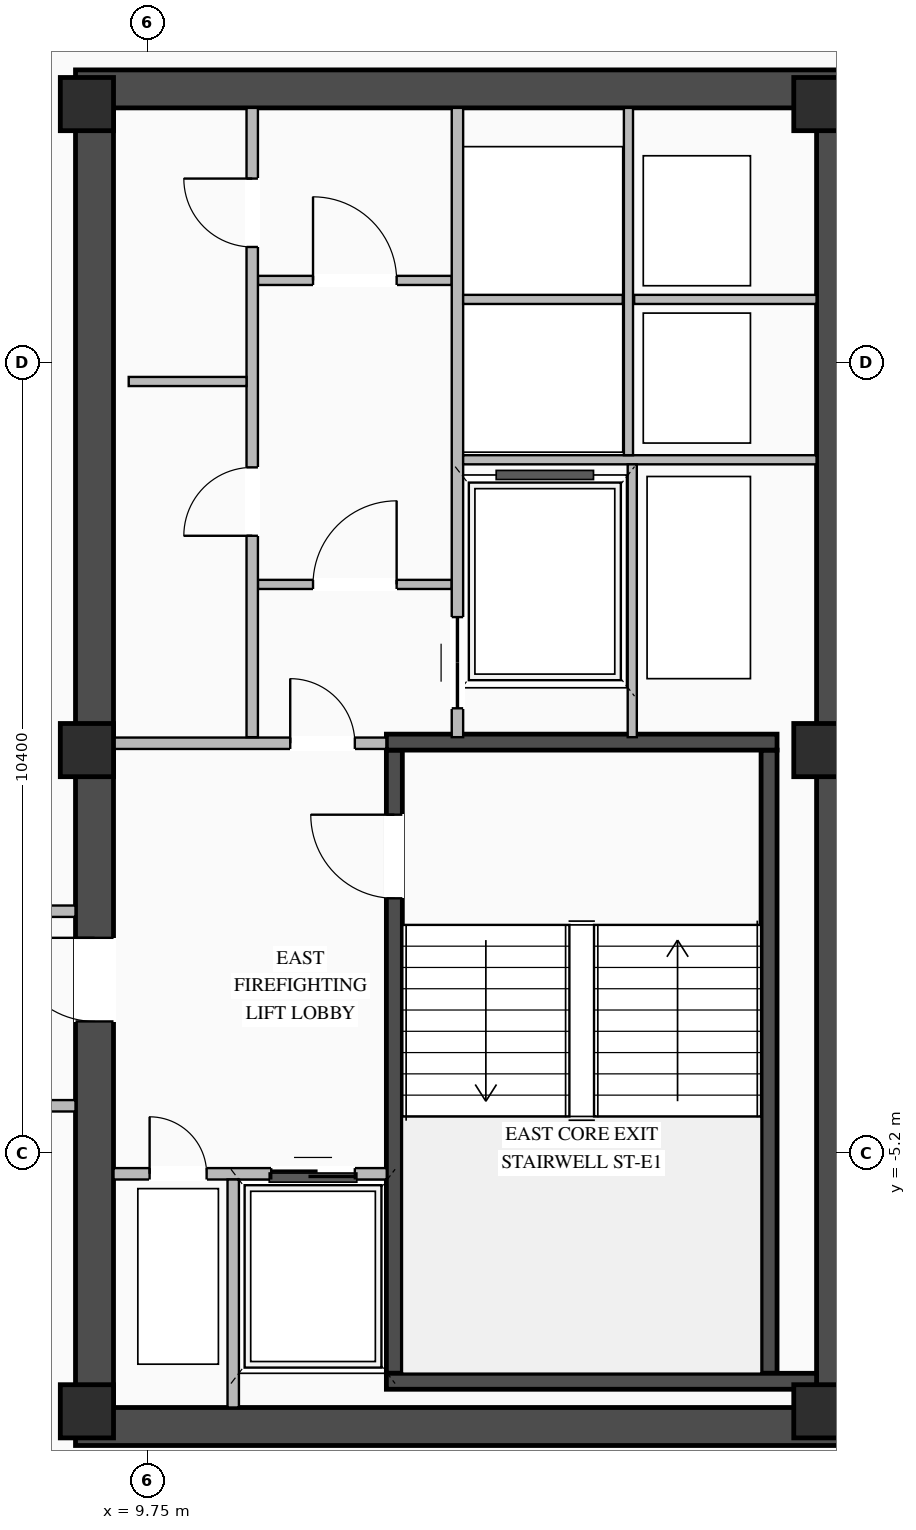
"""IFC4 building model, lengths in metres.
Left out: names, types, materials, properties, quantities, classifications, styles, units other than length and angle.
Written with IfcOpenShell. Run it as: python <this file> out.ifc"""

import sys

from ifc_helpers import new_model, si_unit, direction, frame, frame_2d, origin, origin_2d, place, context, subcontext, project, spatial, rectangle, extrude, element, fill, save


model = new_model("IFC4")
c1 = context("Model", 3, precision=1e-05, world=origin(), true_north=direction((0.0, 1.0)))
c2 = subcontext(c1, "Body", "Model", "MODEL_VIEW")
j1 = project(units=[si_unit("LENGTHUNIT", "METRE"), si_unit("PLANEANGLEUNIT", "RADIAN")], contexts=[c1])
p1 = place(None, origin())
s1 = spatial("IfcSite", under=j1, at=p1, CompositionType="ELEMENT")
p2 = place(p1, origin())
s2 = spatial("IfcBuilding", under=s1, at=p2, CompositionType="ELEMENT")
p3 = place(p2, frame((0.0, 0.0, 286.95)))
s3 = spatial("IfcBuildingStorey", under=s2, at=p3, CompositionType="ELEMENT", Elevation=286.95)
for number, where, z_axis, x_axis in (
    (1, (8.8, -8.8, 0.0), (0.0, 0.0, 1.0), (1.0, 0.0, 0.0)),
    (2, (8.8, 8.8, 0.0), (0.0, 0.0, 1.0), (1.0, 0.0, 0.0)),
):
    element("IfcWall", number, at=place(p3, frame(where, z_axis=z_axis, x_axis=x_axis)), inside=s3, PredefinedType="SHEAR", context=c2, shape_type="SweptSolid", body=[
        extrude(rectangle(XDim=10.25, YDim=0.5, at=frame_2d((5.125, 0.0))), origin(), (0.0, 0.0, 1.0), 3.35),
    ])
p4 = place(p3, frame((9.05, -8.55, 0.0), z_axis=(0.0, 0.0, 1.0), x_axis=(0.0, 1.0, 0.0)))
e3 = element("IfcWall", 3, at=p4, inside=s3, PredefinedType="SHEAR", context=c2, shape_type="SweptSolid", body=[
    extrude(rectangle(XDim=17.1, YDim=0.5, at=frame_2d((8.55, 0.0))), origin(), (0.0, 0.0, 1.0), 3.35),
])
p5 = place(p4, frame((5.08, 0.0, 0.0)))
e4 = element("IfcOpeningElement", 4, at=p5, cuts=e3, PredefinedType="OPENING", context=c2, shape_type="SweptSolid", body=[
    extrude(rectangle(XDim=1.1, YDim=2.08, at=frame_2d((0.55, 1.04))), frame((0.0, 0.26, 0.0), z_axis=(0.0, -1.0, 0.0), x_axis=(1.0, 0.0, 0.0)), (0.0, 0.0, 1.0), 0.52),
])
p6 = place(p3, frame((18.8, -8.55, 0.0), z_axis=(0.0, 0.0, 1.0), x_axis=(0.0, 1.0, 0.0)))
e5 = element("IfcWall", 5, at=p6, inside=s3, PredefinedType="SHEAR", context=c2, shape_type="SweptSolid", body=[
    extrude(rectangle(XDim=17.1, YDim=0.5, at=frame_2d((8.55, 0.0))), origin(), (0.0, 0.0, 1.0), 3.35),
])
p7 = place(p3, frame((12.995, -8.1, 0.0), z_axis=(0.0, 0.0, 1.0), x_axis=(0.0, 1.0, 0.0)))
e6 = element("IfcWall", 6, at=p7, inside=s3, PredefinedType="SHEAR", context=c2, shape_type="SweptSolid", body=[
    extrude(rectangle(XDim=8.2, YDim=0.21, at=frame_2d((4.1, 0.0))), origin(), (0.0, 0.0, 1.0), 3.35),
])
p8 = place(p7, frame((6.25, 0.0, 0.0)))
e7 = element("IfcOpeningElement", 7, at=p8, cuts=e6, PredefinedType="OPENING", context=c2, shape_type="SweptSolid", body=[
    extrude(rectangle(XDim=1.1, YDim=2.15, at=frame_2d((0.55, 1.075))), frame((0.0, 0.115, 0.0), z_axis=(0.0, -1.0, 0.0), x_axis=(1.0, 0.0, 0.0)), (0.0, 0.0, 1.0), 0.23),
])
p9 = place(p3, frame((17.925, -8.1, 0.0), z_axis=(0.0, 0.0, 1.0), x_axis=(0.0, 1.0, 0.0)))
e8 = element("IfcWall", 8, at=p9, inside=s3, PredefinedType="SHEAR", context=c2, shape_type="SweptSolid", body=[
    extrude(rectangle(XDim=8.2, YDim=0.21, at=frame_2d((4.1, 0.0))), origin(), (0.0, 0.0, 1.0), 3.35),
])
p10 = place(p3, frame((12.89, -8.205, 0.0), z_axis=(0.0, 0.0, 1.0), x_axis=(1.0, 0.0, 0.0)))
e9 = element("IfcWall", 9, at=p10, inside=s3, PredefinedType="SHEAR", context=c2, shape_type="SweptSolid", body=[
    extrude(rectangle(XDim=5.66, YDim=0.21, at=frame_2d((2.83, 0.0))), origin(), (0.0, 0.0, 1.0), 3.35),
])
p11 = place(p3, frame((18.03, 0.205, 0.0), z_axis=(0.0, 0.0, 1.0), x_axis=(-1.0, 0.0, 0.0)))
e10 = element("IfcWall", 10, at=p11, inside=s3, PredefinedType="SHEAR", context=c2, shape_type="SweptSolid", body=[
    extrude(rectangle(XDim=5.14, YDim=0.21, at=frame_2d((2.57, 0.0))), origin(), (0.0, 0.0, 1.0), 3.35),
])
for number, where, z_axis, x_axis in (
    (11, (8.95, -8.6, 0.0), (0.0, 0.0, 1.0), (1.0, 0.0, 0.0)),
    (12, (8.95, 0.1, 0.0), (0.0, 0.0, 1.0), (1.0, 0.0, 0.0)),
    (13, (8.95, 8.6, 0.0), (0.0, 0.0, 1.0), (1.0, 0.0, 0.0)),
    (14, (18.6, -8.6, 0.0), (0.0, 0.0, 1.0), (1.0, 0.0, 0.0)),
    (15, (18.6, 0.1, 0.0), (0.0, 0.0, 1.0), (1.0, 0.0, 0.0)),
    (16, (18.6, 8.6, 0.0), (0.0, 0.0, 1.0), (1.0, 0.0, 0.0)),
):
    element("IfcColumn", number, at=place(p3, frame(where, z_axis=z_axis, x_axis=x_axis)), inside=s3, PredefinedType="COLUMN", context=c2, shape_type="SweptSolid", body=[
        extrude(rectangle(XDim=0.7, YDim=0.7, at=origin_2d()), origin(), (0.0, 0.0, 1.0), 3.6),
    ])
p12 = place(p3, frame((9.3, -5.475, 0.0), z_axis=(0.0, 0.0, 1.0), x_axis=(1.0, 0.0, 0.0)))
e17 = element("IfcWall", 17, at=p12, inside=s3, PredefinedType="STANDARD", context=c2, shape_type="SweptSolid", body=[
    extrude(rectangle(XDim=3.595, YDim=0.15, at=frame_2d((1.797, 0.0))), origin(), (0.0, 0.0, 1.0), 3.33),
])
p13 = place(p12, frame((2.075, 0.0, 0.0)))
e18 = element("IfcOpeningElement", 18, at=p13, cuts=e17, PredefinedType="OPENING", context=c2, shape_type="SweptSolid", body=[
    extrude(rectangle(XDim=1.1, YDim=2.15, at=frame_2d((0.55, 1.075))), frame((0.0, 0.085, 0.0), z_axis=(0.0, -1.0, 0.0), x_axis=(1.0, 0.0, 0.0)), (0.0, 0.0, 1.0), 0.17),
])
p14 = place(p12, frame((0.475, 0.0, 0.0)))
e19 = element("IfcOpeningElement", 19, at=p14, cuts=e17, PredefinedType="OPENING", context=c2, shape_type="SweptSolid", body=[
    extrude(rectangle(XDim=0.75, YDim=2.05, at=frame_2d((0.375, 1.025))), frame((0.0, 0.085, 0.0), z_axis=(0.0, -1.0, 0.0), x_axis=(1.0, 0.0, 0.0)), (0.0, 0.0, 1.0), 0.17),
])
p15 = place(p3, frame((10.875, -8.55, 0.0), z_axis=(0.0, 0.0, 1.0), x_axis=(0.0, 1.0, 0.0)))
e20 = element("IfcWall", 20, at=p15, inside=s3, PredefinedType="STANDARD", context=c2, shape_type="SweptSolid", body=[
    extrude(rectangle(XDim=3.0, YDim=0.15, at=frame_2d((1.5, 0.0))), origin(), (0.0, 0.0, 1.0), 3.33),
])
p16 = place(p3, frame((9.3, 0.19, 0.0), z_axis=(0.0, 0.0, 1.0), x_axis=(1.0, 0.0, 0.0)))
e21 = element("IfcWall", 21, at=p16, inside=s3, PredefinedType="STANDARD", context=c2, shape_type="SweptSolid", body=[
    extrude(rectangle(XDim=3.59, YDim=0.15, at=frame_2d((1.795, 0.0))), origin(), (0.0, 0.0, 1.0), 2.825),
])
p17 = place(p16, frame((2.325, 0.0, 0.0)))
e22 = element("IfcOpeningElement", 22, at=p17, cuts=e21, PredefinedType="OPENING", context=c2, shape_type="SweptSolid", body=[
    extrude(rectangle(XDim=0.85, YDim=2.04, at=frame_2d((0.425, 1.02))), frame((0.0, 0.085, 0.0), z_axis=(0.0, -1.0, 0.0), x_axis=(1.0, 0.0, 0.0)), (0.0, 0.0, 1.0), 0.17),
])
p18 = place(p3, frame((11.2, 2.28, 0.0), z_axis=(0.0, 0.0, 1.0), x_axis=(1.0, 0.0, 0.0)))
e23 = element("IfcWall", 23, at=p18, inside=s3, PredefinedType="STANDARD", context=c2, shape_type="SweptSolid", body=[
    extrude(rectangle(XDim=2.55, YDim=0.12, at=frame_2d((1.275, 0.0))), origin(), (0.0, 0.0, 1.0), 3.33),
])
p19 = place(p18, frame((0.725, 0.0, 0.0)))
e24 = element("IfcOpeningElement", 24, at=p19, cuts=e23, PredefinedType="OPENING", context=c2, shape_type="SweptSolid", body=[
    extrude(rectangle(XDim=1.1, YDim=2.1, at=frame_2d((0.55, 1.05))), frame((0.0, 0.07, 0.0), z_axis=(0.0, -1.0, 0.0), x_axis=(1.0, 0.0, 0.0)), (0.0, 0.0, 1.0), 0.14),
])
p20 = place(p3, frame((11.2, 6.28, 0.0), z_axis=(0.0, 0.0, 1.0), x_axis=(1.0, 0.0, 0.0)))
e25 = element("IfcWall", 25, at=p20, inside=s3, PredefinedType="STANDARD", context=c2, shape_type="SweptSolid", body=[
    extrude(rectangle(XDim=2.55, YDim=0.12, at=frame_2d((1.275, 0.0))), origin(), (0.0, 0.0, 1.0), 3.33),
])
p21 = place(p20, frame((0.725, 0.0, 0.0)))
e26 = element("IfcOpeningElement", 26, at=p21, cuts=e25, PredefinedType="OPENING", context=c2, shape_type="SweptSolid", body=[
    extrude(rectangle(XDim=1.1, YDim=2.1, at=frame_2d((0.55, 1.05))), frame((0.0, 0.07, 0.0), z_axis=(0.0, -1.0, 0.0), x_axis=(1.0, 0.0, 0.0)), (0.0, 0.0, 1.0), 0.14),
])
p22 = place(p3, frame((11.125, 0.27, 0.0), z_axis=(0.0, 0.0, 1.0), x_axis=(0.0, 1.0, 0.0)))
e27 = element("IfcWall", 27, at=p22, inside=s3, PredefinedType="STANDARD", context=c2, shape_type="SweptSolid", body=[
    extrude(rectangle(XDim=8.28, YDim=0.15, at=frame_2d((4.14, 0.0))), origin(), (0.0, 0.0, 1.0), 3.33),
])
p23 = place(p22, frame((2.65, 0.0, 0.0)))
e28 = element("IfcOpeningElement", 28, at=p23, cuts=e27, PredefinedType="OPENING", context=c2, shape_type="SweptSolid", body=[
    extrude(rectangle(XDim=0.9, YDim=2.05, at=frame_2d((0.45, 1.025))), frame((0.0, 0.085, 0.0), z_axis=(0.0, -1.0, 0.0), x_axis=(1.0, 0.0, 0.0)), (0.0, 0.0, 1.0), 0.17),
])
p24 = place(p22, frame((6.45, 0.0, 0.0)))
e29 = element("IfcOpeningElement", 29, at=p24, cuts=e27, PredefinedType="OPENING", context=c2, shape_type="SweptSolid", body=[
    extrude(rectangle(XDim=0.9, YDim=2.05, at=frame_2d((0.45, 1.025))), frame((0.0, 0.085, 0.0), z_axis=(0.0, -1.0, 0.0), x_axis=(1.0, 0.0, 0.0)), (0.0, 0.0, 1.0), 0.17),
])
p25 = place(p3, frame((9.5, 4.95, 0.0), z_axis=(0.0, 0.0, 1.0), x_axis=(1.0, 0.0, 0.0)))
e30 = element("IfcWall", 30, at=p25, inside=s3, PredefinedType="STANDARD", context=c2, shape_type="SweptSolid", body=[
    extrude(rectangle(XDim=1.55, YDim=0.12, at=frame_2d((0.775, 0.0))), origin(), (0.0, 0.0, 1.0), 3.33),
])
p26 = place(p3, frame((13.825, 0.27, 0.0), z_axis=(0.0, 0.0, 1.0), x_axis=(0.0, 1.0, 0.0)))
e31 = element("IfcWall", 31, at=p26, inside=s3, PredefinedType="STANDARD", context=c2, shape_type="SweptSolid", body=[
    extrude(rectangle(XDim=8.28, YDim=0.15, at=frame_2d((4.14, 0.0))), origin(), (0.0, 0.0, 1.0), 3.33),
])
p27 = place(p26, frame((0.38, 0.0, 0.0)))
e32 = element("IfcOpeningElement", 32, at=p27, cuts=e31, PredefinedType="OPENING", context=c2, shape_type="SweptSolid", body=[
    extrude(rectangle(XDim=1.2, YDim=2.1, at=frame_2d((0.6, 1.05))), frame((0.0, 0.085, 0.0), z_axis=(0.0, -1.0, 0.0), x_axis=(1.0, 0.0, 0.0)), (0.0, 0.0, 1.0), 0.17),
])
p28 = place(p3, frame((13.9, 3.92, 0.0), z_axis=(0.0, 0.0, 1.0), x_axis=(1.0, 0.0, 0.0)))
e33 = element("IfcWall", 33, at=p28, inside=s3, PredefinedType="STANDARD", context=c2, shape_type="SweptSolid", body=[
    extrude(rectangle(XDim=4.65, YDim=0.12, at=frame_2d((2.325, 0.0))), origin(), (0.0, 0.0, 1.0), 3.33),
])
p29 = place(p3, frame((16.15, 6.03, 0.0), z_axis=(0.0, 0.0, 1.0), x_axis=(1.0, 0.0, 0.0)))
e34 = element("IfcWall", 34, at=p29, inside=s3, PredefinedType="STANDARD", context=c2, shape_type="SweptSolid", body=[
    extrude(rectangle(XDim=2.4, YDim=0.12, at=frame_2d((1.2, 0.0))), origin(), (0.0, 0.0, 1.0), 3.33),
])
p30 = place(p3, frame((16.075, 3.98, 0.0), z_axis=(0.0, 0.0, 1.0), x_axis=(0.0, 1.0, 0.0)))
e35 = element("IfcWall", 35, at=p30, inside=s3, PredefinedType="STANDARD", context=c2, shape_type="SweptSolid", body=[
    extrude(rectangle(XDim=4.57, YDim=0.12, at=frame_2d((2.285, 0.0))), origin(), (0.0, 0.0, 1.0), 3.33),
])
p31 = place(p3, frame((13.9, 6.03, 0.0), z_axis=(0.0, 0.0, 1.0), x_axis=(1.0, 0.0, 0.0)))
e36 = element("IfcWall", 36, at=p31, inside=s3, PredefinedType="STANDARD", context=c2, shape_type="SweptSolid", body=[
    extrude(rectangle(XDim=2.1, YDim=0.12, at=frame_2d((1.05, 0.0))), origin(), (0.0, 0.0, 1.0), 3.33),
])
p32 = place(p3, frame((16.125, 0.27, 0.0), z_axis=(0.0, 0.0, 1.0), x_axis=(0.0, 1.0, 0.0)))
e37 = element("IfcWall", 37, at=p32, inside=s3, PredefinedType="STANDARD", context=c2, shape_type="SweptSolid", body=[
    extrude(rectangle(XDim=3.59, YDim=0.12, at=frame_2d((1.795, 0.0))), origin(), (0.0, 0.0, 1.0), 3.33),
])
p33 = place(p3, frame((-8.8, -2.02, 0.0), z_axis=(0.0, 0.0, 1.0), x_axis=(1.0, 0.0, 0.0)))
e38 = element("IfcWall", 38, at=p33, inside=s3, PredefinedType="STANDARD", context=c2, shape_type="SweptSolid", body=[
    extrude(rectangle(XDim=17.6, YDim=0.15, at=frame_2d((8.8, 0.0))), origin(), (0.0, 0.0, 1.0), 3.33),
])
p34 = place(p33, frame((4.6, 0.0, 0.0)))
e39 = element("IfcOpeningElement", 39, at=p34, cuts=e38, PredefinedType="OPENING", context=c2, shape_type="SweptSolid", body=[
    extrude(rectangle(XDim=1.0, YDim=2.02, at=frame_2d((0.5, 1.01))), frame((0.0, 0.085, 0.0), z_axis=(0.0, -1.0, 0.0), x_axis=(1.0, 0.0, 0.0)), (0.0, 0.0, 1.0), 0.17),
])
p35 = place(p33, frame((13.4, 0.0, 0.0)))
e40 = element("IfcOpeningElement", 40, at=p35, cuts=e38, PredefinedType="OPENING", context=c2, shape_type="SweptSolid", body=[
    extrude(rectangle(XDim=1.0, YDim=2.02, at=frame_2d((0.5, 1.01))), frame((0.0, 0.085, 0.0), z_axis=(0.0, -1.0, 0.0), x_axis=(1.0, 0.0, 0.0)), (0.0, 0.0, 1.0), 0.17),
])
p36 = place(p3, frame((-8.8, -4.58, 0.0), z_axis=(0.0, 0.0, 1.0), x_axis=(1.0, 0.0, 0.0)))
e41 = element("IfcWall", 41, at=p36, inside=s3, PredefinedType="STANDARD", context=c2, shape_type="SweptSolid", body=[
    extrude(rectangle(XDim=17.6, YDim=0.15, at=frame_2d((8.8, 0.0))), origin(), (0.0, 0.0, 1.0), 3.33),
])
p37 = place(p36, frame((4.6, 0.0, 0.0)))
e42 = element("IfcOpeningElement", 42, at=p37, cuts=e41, PredefinedType="OPENING", context=c2, shape_type="SweptSolid", body=[
    extrude(rectangle(XDim=1.0, YDim=2.02, at=frame_2d((0.5, 1.01))), frame((0.0, 0.085, 0.0), z_axis=(0.0, -1.0, 0.0), x_axis=(1.0, 0.0, 0.0)), (0.0, 0.0, 1.0), 0.17),
])
p38 = place(p8, origin())
e43 = element("IfcDoor", 43, at=p38, inside=s3, OperationType="SINGLE_SWING_RIGHT", PredefinedType="DOOR", context=c2, shape_type="SweptSolid", body=[
    extrude(rectangle(XDim=1.1, YDim=2.15, at=frame_2d((0.55, 1.075))), frame((0.0, 0.025, 0.0), z_axis=(0.0, -1.0, 0.0), x_axis=(1.0, 0.0, 0.0)), (0.0, 0.0, 1.0), 0.05),
])
fill(e7, e43)
p39 = place(p13, origin())
e44 = element("IfcDoor", 44, at=p39, inside=s3, OperationType="DOUBLE_DOOR_SLIDING", PredefinedType="DOOR", context=c2, shape_type="SweptSolid", body=[
    extrude(rectangle(XDim=1.1, YDim=2.15, at=frame_2d((0.55, 1.075))), frame((0.0, 0.025, 0.0), z_axis=(0.0, -1.0, 0.0), x_axis=(1.0, 0.0, 0.0)), (0.0, 0.0, 1.0), 0.05),
])
fill(e18, e44)
p40 = place(p14, origin())
e45 = element("IfcDoor", 45, at=p40, inside=s3, OperationType="SINGLE_SWING_LEFT", PredefinedType="DOOR", context=c2, shape_type="SweptSolid", body=[
    extrude(rectangle(XDim=0.75, YDim=2.05, at=frame_2d((0.375, 1.025))), frame((0.0, 0.025, 0.0), z_axis=(0.0, -1.0, 0.0), x_axis=(1.0, 0.0, 0.0)), (0.0, 0.0, 1.0), 0.05),
])
fill(e19, e45)
p41 = place(p17, origin())
e46 = element("IfcDoor", 46, at=p41, inside=s3, OperationType="SINGLE_SWING_LEFT", PredefinedType="DOOR", context=c2, shape_type="SweptSolid", body=[
    extrude(rectangle(XDim=0.85, YDim=2.04, at=frame_2d((0.425, 1.02))), frame((0.0, 0.025, 0.0), z_axis=(0.0, -1.0, 0.0), x_axis=(1.0, 0.0, 0.0)), (0.0, 0.0, 1.0), 0.05),
])
fill(e22, e46)
p42 = place(p5, origin())
e47 = element("IfcDoor", 47, at=p42, inside=s3, OperationType="SINGLE_SWING_RIGHT", PredefinedType="DOOR", context=c2, shape_type="SweptSolid", body=[
    extrude(rectangle(XDim=1.1, YDim=2.08, at=frame_2d((0.55, 1.04))), frame((0.0, -0.155, 0.0), z_axis=(0.0, -1.0, 0.0), x_axis=(1.0, 0.0, 0.0)), (0.0, 0.0, 1.0), 0.05),
])
fill(e4, e47)
p43 = place(p19, origin())
e48 = element("IfcDoor", 48, at=p43, inside=s3, OperationType="SINGLE_SWING_RIGHT", PredefinedType="DOOR", context=c2, shape_type="SweptSolid", body=[
    extrude(rectangle(XDim=1.1, YDim=2.1, at=frame_2d((0.55, 1.05))), frame((0.0, 0.025, 0.0), z_axis=(0.0, -1.0, 0.0), x_axis=(1.0, 0.0, 0.0)), (0.0, 0.0, 1.0), 0.05),
])
fill(e24, e48)
p44 = place(p21, origin())
e49 = element("IfcDoor", 49, at=p44, inside=s3, OperationType="SINGLE_SWING_LEFT", PredefinedType="DOOR", context=c2, shape_type="SweptSolid", body=[
    extrude(rectangle(XDim=1.1, YDim=2.1, at=frame_2d((0.55, 1.05))), frame((0.0, 0.025, 0.0), z_axis=(0.0, -1.0, 0.0), x_axis=(1.0, 0.0, 0.0)), (0.0, 0.0, 1.0), 0.05),
])
fill(e26, e49)
p45 = place(p23, origin())
e50 = element("IfcDoor", 50, at=p45, inside=s3, OperationType="SINGLE_SWING_LEFT", PredefinedType="DOOR", context=c2, shape_type="SweptSolid", body=[
    extrude(rectangle(XDim=0.9, YDim=2.05, at=frame_2d((0.45, 1.025))), frame((0.0, 0.025, 0.0), z_axis=(0.0, -1.0, 0.0), x_axis=(1.0, 0.0, 0.0)), (0.0, 0.0, 1.0), 0.05),
])
fill(e28, e50)
p46 = place(p24, origin())
e51 = element("IfcDoor", 51, at=p46, inside=s3, OperationType="SINGLE_SWING_RIGHT", PredefinedType="DOOR", context=c2, shape_type="SweptSolid", body=[
    extrude(rectangle(XDim=0.9, YDim=2.05, at=frame_2d((0.45, 1.025))), frame((0.0, 0.025, 0.0), z_axis=(0.0, -1.0, 0.0), x_axis=(1.0, 0.0, 0.0)), (0.0, 0.0, 1.0), 0.05),
])
fill(e29, e51)
p47 = place(p27, origin())
e52 = element("IfcDoor", 52, at=p47, inside=s3, OperationType="DOUBLE_DOOR_SLIDING", PredefinedType="DOOR", context=c2, shape_type="SweptSolid", body=[
    extrude(rectangle(XDim=1.2, YDim=2.1, at=frame_2d((0.6, 1.05))), frame((0.0, 0.025, 0.0), z_axis=(0.0, -1.0, 0.0), x_axis=(1.0, 0.0, 0.0)), (0.0, 0.0, 1.0), 0.05),
])
fill(e32, e52)
save(model, sys.argv[1])
